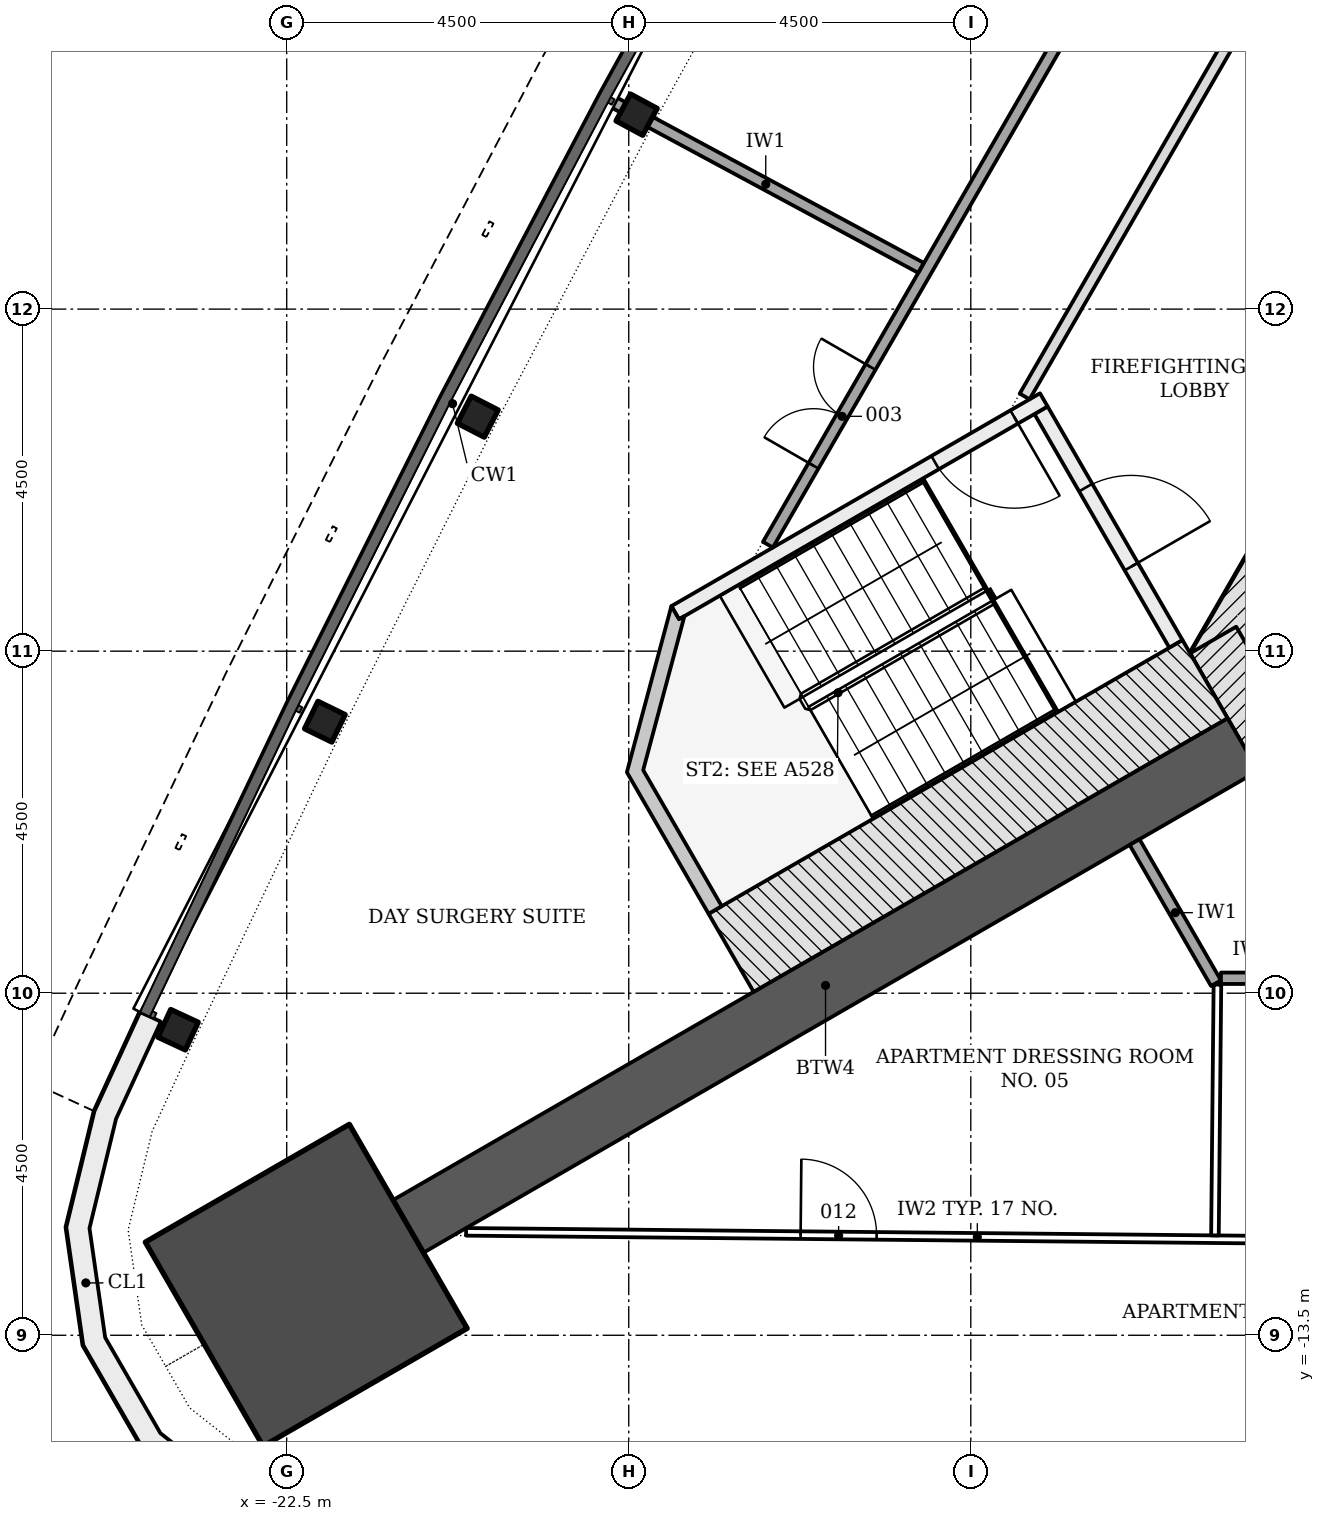
"""IFC4 building model, lengths in metres.
Left out: names, types, materials, properties, quantities, classifications, styles, units other than length and angle.
Written with IfcOpenShell. Run it as: python <this file> out.ifc"""

import sys

from ifc_helpers import new_model, si_unit, direction, frame, frame_2d, origin, origin_2d, place, context, subcontext, project, spatial, polyline, rectangle, i_section, outline, extrude, element, fill, save


model = new_model("IFC4")
c1 = context("Model", 3, precision=1e-05, world=origin(), true_north=direction((0.0, 1.0)))
c2 = subcontext(c1, "Body", "Model", "MODEL_VIEW")
j1 = project(units=[si_unit("LENGTHUNIT", "METRE"), si_unit("PLANEANGLEUNIT", "RADIAN")], contexts=[c1])
p1 = place(None, origin())
s1 = spatial("IfcSite", under=j1, at=p1, CompositionType="ELEMENT")
p2 = place(p1, origin())
s2 = spatial("IfcBuilding", under=s1, at=p2, CompositionType="ELEMENT")
p3 = place(p2, frame((0.0, 0.0, 98.7)))
s3 = spatial("IfcBuildingStorey", under=s2, at=p3, CompositionType="ELEMENT", Elevation=98.7)
p4 = place(p3, frame((-1.083, 11.281, -0.2), z_axis=(0.0, 0.0, 1.0), x_axis=(-0.500001446645, -0.866024568562, 0.0)))
e1 = element("IfcWall", 1, at=p4, inside=s3, PredefinedType="SHEAR", context=c2, shape_type="SweptSolid", body=[
    extrude(rectangle(XDim=18.458, YDim=0.7, at=frame_2d((9.229, 0.0))), origin(), (0.0, 0.0, 1.0), 3.6),
])
p5 = place(p4, frame((8.979, 0.0, 0.2)))
e2 = element("IfcOpeningElement", 2, at=p5, cuts=e1, PredefinedType="OPENING", context=c2, shape_type="SweptSolid", body=[
    extrude(rectangle(XDim=1.2, YDim=2.1, at=frame_2d((0.6, 1.05))), frame((0.0, 0.36, 0.0), z_axis=(0.0, -1.0, 0.0), x_axis=(1.0, 0.0, 0.0)), (0.0, 0.0, 1.0), 0.72),
])
p6 = place(p4, frame((11.029, 0.0, 0.2)))
e3 = element("IfcOpeningElement", 3, at=p6, cuts=e1, PredefinedType="OPENING", context=c2, shape_type="SweptSolid", body=[
    extrude(rectangle(XDim=1.2, YDim=2.1, at=frame_2d((0.6, 1.05))), frame((0.0, 0.36, 0.0), z_axis=(0.0, -1.0, 0.0), x_axis=(1.0, 0.0, 0.0)), (0.0, 0.0, 1.0), 0.72),
])
p7 = place(p3, frame((-10.311, -4.353, -0.2), z_axis=(0.0, 0.0, 1.0), x_axis=(0.500042739161, -0.866000726912, 0.0)))
e4 = element("IfcWall", 4, at=p7, inside=s3, PredefinedType="SHEAR", context=c2, shape_type="SweptSolid", body=[
    extrude(rectangle(XDim=2.771, YDim=0.7, at=frame_2d((1.386, 0.0))), origin(), (0.0, 0.0, 1.0), 3.6),
])
p8 = place(p3, frame((-9.922, -5.728, -0.2), z_axis=(0.0, 0.0, 1.0), x_axis=(-0.866029086277, -0.499993621681, 0.0)))
e5 = element("IfcWall", 5, at=p8, inside=s3, PredefinedType="SHEAR", context=c2, shape_type="SweptSolid", body=[
    extrude(rectangle(XDim=12.677, YDim=0.8, at=frame_2d((6.339, 0.0))), origin(), (0.0, 0.0, 1.0), 3.6),
])
p9 = place(p3, frame((-22.243, -12.842, -0.2), z_axis=(0.0, 0.0, 1.0), x_axis=(-0.866025403784, -0.5, 0.0)))
e6 = element("IfcColumn", 6, at=p9, inside=s3, PredefinedType="COLUMN", context=c2, shape_type="SweptSolid", body=[
    extrude(rectangle(XDim=3.1, YDim=3.1, at=origin_2d()), origin(), (0.0, 0.0, 1.0), 3.6),
])
for number, where, z_axis, x_axis in (
    (7, (-17.897, 2.558, -0.2), (0.0, 0.0, 1.0), (-0.474, -0.88, 0.0)),
    (8, (-19.986, -1.415, -0.2), (0.0, 0.0, 1.0), (-0.457, -0.89, 0.0)),
    (9, (-21.998, -5.428, -0.2), (0.0, 0.0, 1.0), (-0.439, -0.898, 0.0)),
    (10, (-23.929, -9.48, -0.2), (0.0, 0.0, 1.0), (-0.421, -0.907, 0.0)),
):
    element("IfcColumn", number, at=place(p3, frame(where, z_axis=z_axis, x_axis=x_axis)), inside=s3, PredefinedType="COLUMN", context=c2, shape_type="SweptSolid", body=[
        extrude(i_section(OverallWidth=0.401, OverallDepth=0.399, WebThickness=0.025, FlangeThickness=0.04, FilletRadius=0.015, at=origin_2d()), origin(), (0.0, 0.0, 1.0), 3.6),
    ])
p10 = place(p3, origin())
e11 = element("IfcWall", 11, at=p10, inside=s3, PredefinedType="NOTDEFINED", context=c2, shape_type="SweptSolid", body=[
    extrude(outline(polyline([(-24.428, -9.249), (-25.03, -10.553), (-25.4, -12.077), (-25.177, -13.63), (-24.392, -14.989), (-23.159, -15.958), (-21.654, -16.4), (-20.224, -16.531), (-20.196, -16.232), (-21.597, -16.104), (-23.019, -15.687), (-24.161, -14.789), (-24.888, -13.53), (-25.094, -12.092), (-24.745, -10.652), (-24.156, -9.374), (-24.428, -9.249)])), origin(), (0.0, 0.0, 1.0), 3.3),
])
p11 = place(p3, frame((-12.576, -1.331, -0.2), z_axis=(0.0, 0.0, 1.0), x_axis=(0.499970499736, -0.8660424351, 0.0)))
e12 = element("IfcWall", 12, at=p11, inside=s3, PredefinedType="SHEAR", context=c2, shape_type="SweptSolid", body=[
    extrude(rectangle(XDim=3.55, YDim=0.2, at=frame_2d((1.775, 0.0))), origin(), (0.0, 0.0, 1.0), 3.6),
])
p12 = place(p11, frame((1.175, 0.0, 0.2)))
e13 = element("IfcOpeningElement", 13, at=p12, cuts=e12, PredefinedType="OPENING", context=c2, shape_type="SweptSolid", body=[
    extrude(rectangle(XDim=1.2, YDim=2.1, at=frame_2d((0.6, 1.05))), frame((0.0, 0.11, 0.0), z_axis=(0.0, -1.0, 0.0), x_axis=(1.0, 0.0, 0.0)), (0.0, 0.0, 1.0), 0.22),
])
p13 = place(p3, frame((-12.539, -1.194, -0.2), z_axis=(0.0, 0.0, 1.0), x_axis=(-0.866045472092, -0.499965239061, 0.0)))
e14 = element("IfcWall", 14, at=p13, inside=s3, PredefinedType="SHEAR", context=c2, shape_type="SweptSolid", body=[
    extrude(rectangle(XDim=5.6, YDim=0.2, at=frame_2d((2.8, 0.0))), origin(), (0.0, 0.0, 1.0), 3.6),
])
p14 = place(p13, frame((0.45, 0.0, 0.2)))
e15 = element("IfcOpeningElement", 15, at=p14, cuts=e14, PredefinedType="OPENING", context=c2, shape_type="SweptSolid", body=[
    extrude(rectangle(XDim=1.2, YDim=2.1, at=frame_2d((0.6, 1.05))), frame((0.0, 0.11, 0.0), z_axis=(0.0, -1.0, 0.0), x_axis=(1.0, 0.0, 0.0)), (0.0, 0.0, 1.0), 0.22),
])
p15 = place(p3, frame((-10.418, -4.868, -0.2), z_axis=(0.0, 0.0, 1.0), x_axis=(-0.866018442252, -0.500012057535, 0.0)))
e16 = element("IfcWall", 16, at=p15, inside=s3, PredefinedType="SHEAR", context=c2, shape_type="SweptSolid", body=[
    extrude(rectangle(XDim=7.2, YDim=1.186, at=frame_2d((3.6, 0.0))), origin(), (0.0, 0.0, 1.0), 3.6),
])
p16 = place(p3, frame((0.0, 0.0, -0.2)))
e17 = element("IfcWall", 17, at=p16, inside=s3, PredefinedType="SHEAR", context=c2, shape_type="SweptSolid", body=[
    extrude(outline(polyline([(-17.439, -3.907), (-18.025, -6.093), (-16.95, -7.955), (-16.777, -7.855), (-17.81, -6.065), (-17.267, -4.039), (-17.339, -4.081), (-17.339, -4.081), (-17.339, -4.081), (-17.339, -4.081), (-17.339, -4.081), (-17.339, -4.081), (-17.339, -4.081), (-17.339, -4.081), (-17.339, -4.081), (-17.339, -4.081), (-17.339, -4.081), (-17.339, -4.081), (-17.339, -4.081), (-17.339, -4.081), (-17.339, -4.081), (-17.339, -4.081), (-17.339, -4.081), (-17.439, -3.907)])), origin(), (0.0, 0.0, 1.0), 3.6),
])
p17 = place(p3, frame((-16.169, -3.099, 0.0), z_axis=(0.0, 0.0, 1.0), x_axis=(0.499999805269, 0.866025516212, 0.0)))
e18 = element("IfcWall", 18, at=p17, inside=s3, PredefinedType="PARTITIONING", context=c2, shape_type="SweptSolid", body=[
    extrude(rectangle(XDim=22.097, YDim=0.15, at=frame_2d((11.049, 0.0))), origin(), (0.0, 0.0, 1.0), 2.778),
])
p18 = place(p17, frame((16.878, 0.0, 0.0)))
e19 = element("IfcOpeningElement", 19, at=p18, cuts=e18, PredefinedType="OPENING", context=c2, shape_type="SweptSolid", body=[
    extrude(rectangle(XDim=1.0, YDim=2.1, at=frame_2d((0.5, 1.05))), frame((0.0, 0.085, 0.0), z_axis=(0.0, -1.0, 0.0), x_axis=(1.0, 0.0, 0.0)), (0.0, 0.0, 1.0), 0.17),
])
p19 = place(p17, frame((7.816, 0.0, 0.0)))
e20 = element("IfcOpeningElement", 20, at=p19, cuts=e18, PredefinedType="OPENING", context=c2, shape_type="SweptSolid", body=[
    extrude(rectangle(XDim=1.5, YDim=2.1, at=frame_2d((0.75, 1.05))), frame((0.0, 0.085, 0.0), z_axis=(0.0, -1.0, 0.0), x_axis=(1.0, 0.0, 0.0)), (0.0, 0.0, 1.0), 0.17),
])
p20 = place(p17, frame((1.2, 0.0, 0.0)))
e21 = element("IfcOpeningElement", 21, at=p20, cuts=e18, PredefinedType="OPENING", context=c2, shape_type="SweptSolid", body=[
    extrude(rectangle(XDim=1.5, YDim=2.1, at=frame_2d((0.75, 1.05))), frame((0.0, 0.085, 0.0), z_axis=(0.0, -1.0, 0.0), x_axis=(1.0, 0.0, 0.0)), (0.0, 0.0, 1.0), 0.17),
])
p21 = place(p3, frame((-4.407, 13.374, 0.0), z_axis=(0.0, 0.0, 1.0), x_axis=(-0.499997181693, -0.866027030928, 0.0)))
e22 = element("IfcWall", 22, at=p21, inside=s3, PredefinedType="PARTITIONING", context=c2, shape_type="SweptSolid", body=[
    extrude(rectangle(XDim=16.77, YDim=0.15, at=frame_2d((8.385, 0.0))), origin(), (0.0, 0.0, 1.0), 2.778),
])
p22 = place(p21, frame((8.879, 0.0, 0.0)))
e23 = element("IfcOpeningElement", 23, at=p22, cuts=e22, PredefinedType="OPENING", context=c2, shape_type="SweptSolid", body=[
    extrude(rectangle(XDim=1.0, YDim=2.1, at=frame_2d((0.5, 1.05))), frame((0.0, 0.085, 0.0), z_axis=(0.0, -1.0, 0.0), x_axis=(1.0, 0.0, 0.0)), (0.0, 0.0, 1.0), 0.17),
])
p23 = place(p3, frame((-11.345, -7.012, 0.0), z_axis=(0.0, 0.0, 1.0), x_axis=(0.499998569178, -0.866026229868, 0.0)))
e24 = element("IfcWall", 24, at=p23, inside=s3, PredefinedType="PARTITIONING", context=c2, shape_type="SweptSolid", body=[
    extrude(rectangle(XDim=2.143, YDim=0.15, at=frame_2d((1.072, 0.0))), origin(), (0.0, 0.0, 1.0), 2.778),
])
p24 = place(p3, frame((-10.209, -8.803, 0.0), z_axis=(0.0, 0.0, 1.0), x_axis=(1.0, 0.0, 0.0)))
e25 = element("IfcWall", 25, at=p24, inside=s3, PredefinedType="PARTITIONING", context=c2, shape_type="SweptSolid", body=[
    extrude(rectangle(XDim=0.83, YDim=0.15, at=frame_2d((0.415, 0.0))), origin(), (0.0, 0.0, 1.0), 3.4),
])
p25 = place(p3, frame((-18.24, 2.743, 0.0), z_axis=(0.0, 0.0, 1.0), x_axis=(0.88042716359, -0.474181410024, 0.0)))
e26 = element("IfcWall", 26, at=p25, inside=s3, PredefinedType="PARTITIONING", context=c2, shape_type="SweptSolid", body=[
    extrude(rectangle(XDim=4.639, YDim=0.15, at=frame_2d((2.32, 0.0))), origin(), (0.0, 0.0, 1.0), 2.778),
])
p26 = place(p3, frame((-20.14, -12.139, 0.0), z_axis=(0.0, 0.0, 1.0), x_axis=(0.999951618297, -0.009836720277, 0.0)))
e27 = element("IfcWall", 27, at=p26, inside=s3, PredefinedType="PARTITIONING", context=c2, shape_type="SweptSolid", body=[
    extrude(rectangle(XDim=13.452, YDim=0.1, at=frame_2d((6.726, 0.0))), origin(), (0.0, 0.0, 1.0), 2.778),
])
p27 = place(p26, frame((4.401, 0.0, 0.0)))
e28 = element("IfcOpeningElement", 28, at=p27, cuts=e27, PredefinedType="OPENING", context=c2, shape_type="SweptSolid", body=[
    extrude(rectangle(XDim=1.0, YDim=2.1, at=frame_2d((0.5, 1.05))), frame((0.0, 0.06, 0.0), z_axis=(0.0, -1.0, 0.0), x_axis=(1.0, 0.0, 0.0)), (0.0, 0.0, 1.0), 0.12),
])
p28 = place(p3, frame((-10.288, -12.186, 0.0), z_axis=(0.0, 0.0, 1.0), x_axis=(0.009841169114, 0.999951574523, 0.0)))
e29 = element("IfcWall", 29, at=p28, inside=s3, PredefinedType="PARTITIONING", context=c2, shape_type="SweptSolid", body=[
    extrude(rectangle(XDim=3.3, YDim=0.1, at=frame_2d((1.65, 0.0))), origin(), (0.0, 0.0, 1.0), 3.4),
])
p29 = place(p12, origin())
e30 = element("IfcDoor", 30, at=p29, inside=s3, OperationType="SINGLE_SWING_RIGHT", PredefinedType="DOOR", context=c2, shape_type="SweptSolid", body=[
    extrude(rectangle(XDim=1.2, YDim=2.1, at=frame_2d((0.6, 1.05))), frame((0.0, 0.025, 0.0), z_axis=(0.0, -1.0, 0.0), x_axis=(1.0, 0.0, 0.0)), (0.0, 0.0, 1.0), 0.05),
])
fill(e13, e30)
p30 = place(p14, origin())
e31 = element("IfcDoor", 31, at=p30, inside=s3, OperationType="SINGLE_SWING_LEFT", PredefinedType="DOOR", context=c2, shape_type="SweptSolid", body=[
    extrude(rectangle(XDim=1.2, YDim=2.1, at=frame_2d((0.6, 1.05))), frame((0.0, 0.025, 0.0), z_axis=(0.0, -1.0, 0.0), x_axis=(1.0, 0.0, 0.0)), (0.0, 0.0, 1.0), 0.05),
])
fill(e15, e31)
p31 = place(p20, origin())
e32 = element("IfcDoor", 32, at=p31, inside=s3, OperationType="DOUBLE_DOOR_SINGLE_SWING", PredefinedType="DOOR", context=c2, shape_type="SweptSolid", body=[
    extrude(rectangle(XDim=1.5, YDim=2.1, at=frame_2d((0.75, 1.05))), frame((0.0, 0.025, 0.0), z_axis=(0.0, -1.0, 0.0), x_axis=(1.0, 0.0, 0.0)), (0.0, 0.0, 1.0), 0.05),
])
fill(e21, e32)
p32 = place(p27, origin())
e33 = element("IfcDoor", 33, at=p32, inside=s3, OperationType="SINGLE_SWING_LEFT", PredefinedType="DOOR", context=c2, shape_type="SweptSolid", body=[
    extrude(rectangle(XDim=1.0, YDim=2.1, at=frame_2d((0.5, 1.05))), frame((0.0, 0.025, 0.0), z_axis=(0.0, -1.0, 0.0), x_axis=(1.0, 0.0, 0.0)), (0.0, 0.0, 1.0), 0.05),
])
fill(e28, e33)
save(model, sys.argv[1])
